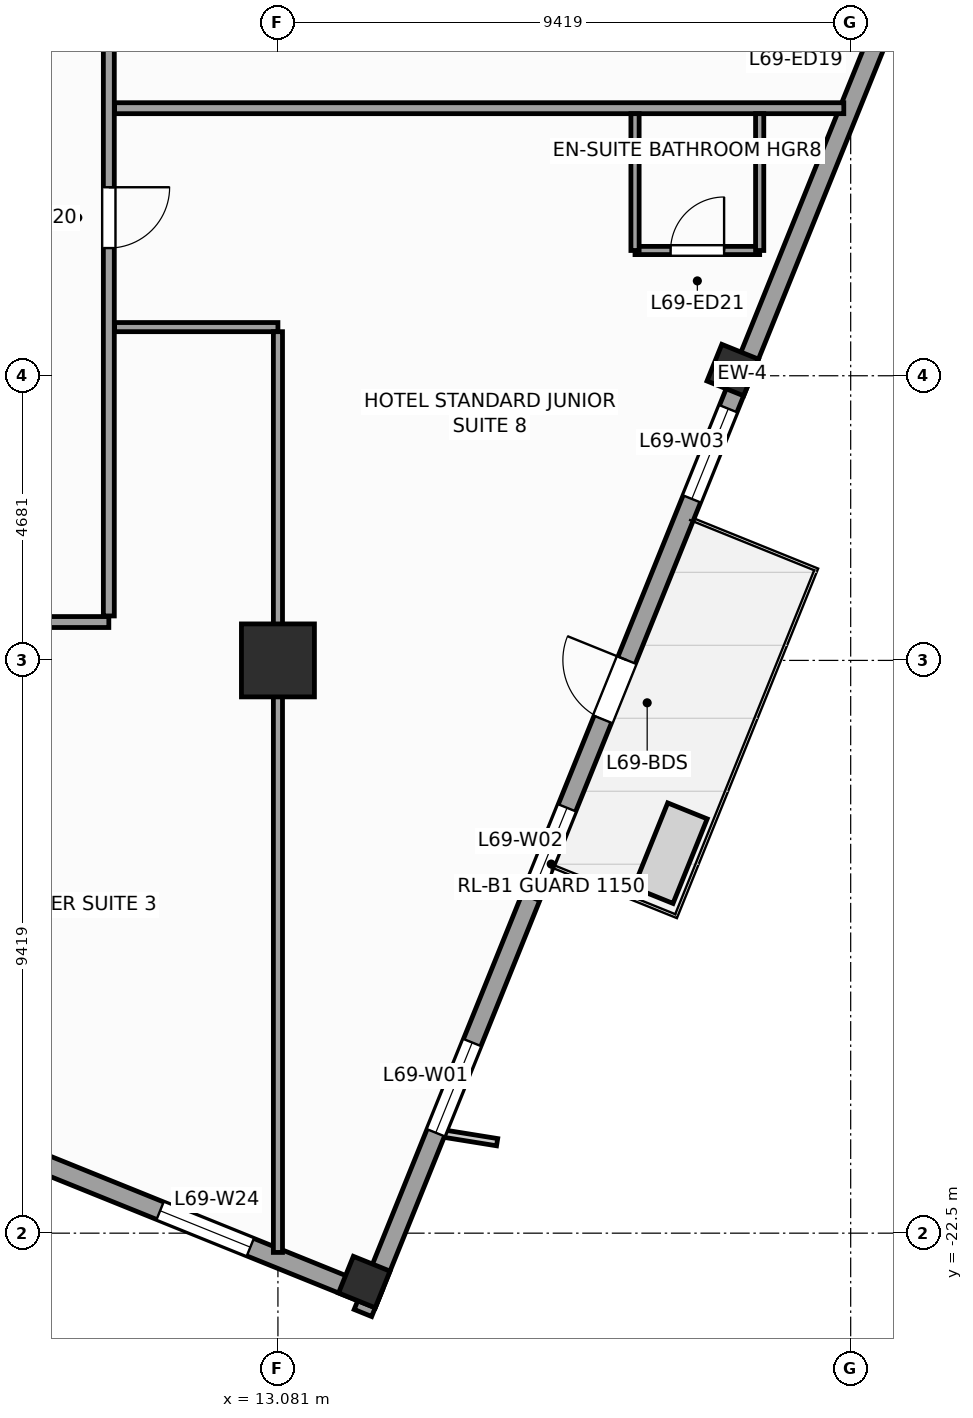
"""IFC4 building model, lengths in metres.
Left out: names, types, materials, properties, quantities, classifications, styles, units other than length and angle.
Written with IfcOpenShell. Run it as: python <this file> out.ifc"""

import sys

from ifc_helpers import new_model, si_unit, direction, frame, frame_2d, origin, origin_2d, place, context, subcontext, project, spatial, rectangle, extrude, source, transform, mapped, element, fill, save


model = new_model("IFC4")
c1 = context("Model", 3, precision=1e-05, world=origin(), true_north=direction((0.0, 1.0)))
c2 = subcontext(c1, "Body", "Model", "MODEL_VIEW")
j1 = project(units=[si_unit("LENGTHUNIT", "METRE"), si_unit("PLANEANGLEUNIT", "RADIAN")], contexts=[c1])
p1 = place(None, origin())
s1 = spatial("IfcSite", under=j1, at=p1, CompositionType="ELEMENT")
p2 = place(p1, origin())
s2 = spatial("IfcBuilding", under=s1, at=p2, CompositionType="ELEMENT")
p3 = place(p2, frame((0.0, 0.0, 283.2)))
s3 = spatial("IfcBuildingStorey", under=s2, at=p3, CompositionType="ELEMENT", Elevation=283.2)
m1 = source(origin(), c2, "Body", "SweptSolid", [
    extrude(rectangle(XDim=1.2, YDim=1.2, at=origin_2d()), origin(), (0.0, 0.0, 1.0), 3.6),
])
p4 = place(p3, frame((13.081, -13.081, 0.0), z_axis=(0.0, 0.0, 1.0), x_axis=(1.0, 0.0, 0.0)))
e1 = element("IfcColumn", 1, at=p4, inside=s3, PredefinedType="COLUMN", context=c2, shape_type="MappedRepresentation", body=[
    mapped(m1, transform((0.0, 0.0, 0.0), scale=1.0)),
])
m2 = source(origin(), c2, "Body", "SweptSolid", [
    extrude(rectangle(XDim=0.65, YDim=0.65, at=origin_2d()), origin(), (0.0, 0.0, 1.0), 3.6),
])
for number, where, z_axis, x_axis in (
    (2, (14.501, -23.304, 0.0), (0.0, 0.0, 1.0), (0.375, 0.927, 0.0)),
    (3, (20.56, -8.307, 0.0), (0.0, 0.0, 1.0), (0.375, 0.927, 0.0)),
):
    element("IfcColumn", number, at=place(p3, frame(where, z_axis=z_axis, x_axis=x_axis)), inside=s3, PredefinedType="COLUMN", context=c2, shape_type="MappedRepresentation", body=[
        mapped(m2, transform((0.0, 0.0, 0.0), scale=1.0)),
    ])
p5 = place(p3, frame((14.479, -23.813, 0.0), z_axis=(0.0, 0.0, 1.0), x_axis=(0.374609557019, 0.927182657188, 0.0)))
e4 = element("IfcWall", 4, at=p5, inside=s3, PredefinedType="STANDARD", context=c2, shape_type="SweptSolid", body=[
    extrude(rectangle(XDim=33.31, YDim=0.31, at=frame_2d((16.655, 0.0))), origin(), (0.0, 0.0, 1.0), 2.75),
])
p6 = place(p5, frame((10.53, 0.0, 0.0)))
e5 = element("IfcOpeningElement", 5, at=p6, cuts=e4, PredefinedType="OPENING", context=c2, shape_type="SweptSolid", body=[
    extrude(rectangle(XDim=1.05, YDim=2.25, at=frame_2d((0.525, 1.125))), frame((0.0, 0.165, 0.0), z_axis=(0.0, -1.0, 0.0), x_axis=(1.0, 0.0, 0.0)), (0.0, 0.0, 1.0), 0.33),
])
p7 = place(p5, frame((3.197, 0.0, 0.47)))
e6 = element("IfcOpeningElement", 6, at=p7, cuts=e4, PredefinedType="OPENING", context=c2, shape_type="SweptSolid", body=[
    extrude(rectangle(XDim=1.6, YDim=2.1, at=frame_2d((0.8, 1.05))), frame((0.0, 0.165, 0.0), z_axis=(0.0, -1.0, 0.0), x_axis=(1.0, 0.0, 0.0)), (0.0, 0.0, 1.0), 0.33),
])
p8 = place(p5, frame((7.36, 0.0, 0.47)))
e7 = element("IfcOpeningElement", 7, at=p8, cuts=e4, PredefinedType="OPENING", context=c2, shape_type="SweptSolid", body=[
    extrude(rectangle(XDim=1.6, YDim=2.1, at=frame_2d((0.8, 1.05))), frame((0.0, 0.165, 0.0), z_axis=(0.0, -1.0, 0.0), x_axis=(1.0, 0.0, 0.0)), (0.0, 0.0, 1.0), 0.33),
])
p9 = place(p5, frame((14.439, 0.0, 0.47)))
e8 = element("IfcOpeningElement", 8, at=p9, cuts=e4, PredefinedType="OPENING", context=c2, shape_type="SweptSolid", body=[
    extrude(rectangle(XDim=1.6, YDim=2.1, at=frame_2d((0.8, 1.05))), frame((0.0, 0.165, 0.0), z_axis=(0.0, -1.0, 0.0), x_axis=(1.0, 0.0, 0.0)), (0.0, 0.0, 1.0), 0.33),
])
p10 = place(p5, frame((23.351, 0.0, 0.47)))
e9 = element("IfcOpeningElement", 9, at=p10, cuts=e4, PredefinedType="OPENING", context=c2, shape_type="SweptSolid", body=[
    extrude(rectangle(XDim=1.6, YDim=2.1, at=frame_2d((0.8, 1.05))), frame((0.0, 0.165, 0.0), z_axis=(0.0, -1.0, 0.0), x_axis=(1.0, 0.0, 0.0)), (0.0, 0.0, 1.0), 0.33),
])
p11 = place(p5, frame((27.847, 0.0, 0.47)))
e10 = element("IfcOpeningElement", 10, at=p11, cuts=e4, PredefinedType="OPENING", context=c2, shape_type="SweptSolid", body=[
    extrude(rectangle(XDim=1.6, YDim=2.1, at=frame_2d((0.8, 1.05))), frame((0.0, 0.165, 0.0), z_axis=(0.0, -1.0, 0.0), x_axis=(1.0, 0.0, 0.0)), (0.0, 0.0, 1.0), 0.33),
])
p12 = place(p3, frame((9.032, -21.278, 0.0), z_axis=(0.0, 0.0, 1.0), x_axis=(0.927185411764, -0.374602739196, 0.0)))
e11 = element("IfcWall", 11, at=p12, inside=s3, PredefinedType="STANDARD", context=c2, shape_type="SweptSolid", body=[
    extrude(rectangle(XDim=6.155, YDim=0.31, at=frame_2d((3.078, 0.0))), origin(), (0.0, 0.0, 1.0), 3.35),
])
p13 = place(p12, frame((2.278, 0.0, 0.47)))
e12 = element("IfcOpeningElement", 12, at=p13, cuts=e11, PredefinedType="OPENING", context=c2, shape_type="SweptSolid", body=[
    extrude(rectangle(XDim=1.6, YDim=2.1, at=frame_2d((0.8, 1.05))), frame((0.0, 0.165, 0.0), z_axis=(0.0, -1.0, 0.0), x_axis=(1.0, 0.0, 0.0)), (0.0, 0.0, 1.0), 0.33),
])
p14 = place(p3, frame((-11.45, -12.45, 0.0), z_axis=(0.0, 0.0, 1.0), x_axis=(1.0, 0.0, 0.0)))
e13 = element("IfcWall", 13, at=p14, inside=s3, PredefinedType="PARTITIONING", context=c2, shape_type="SweptSolid", body=[
    extrude(rectangle(XDim=21.75, YDim=0.18, at=frame_2d((10.875, 0.0))), origin(), (0.0, 0.0, 1.0), 3.35),
])
p15 = place(p14, frame((12.436, 0.0, 0.0)))
e14 = element("IfcOpeningElement", 14, at=p15, cuts=e13, PredefinedType="OPENING", context=c2, shape_type="SweptSolid", body=[
    extrude(rectangle(XDim=0.95, YDim=2.1, at=frame_2d((0.475, 1.05))), frame((0.0, 0.1, 0.0), z_axis=(0.0, -1.0, 0.0), x_axis=(1.0, 0.0, 0.0)), (0.0, 0.0, 1.0), 0.2),
])
p16 = place(p14, frame((18.186, 0.0, 0.0)))
e15 = element("IfcOpeningElement", 15, at=p16, cuts=e13, PredefinedType="OPENING", context=c2, shape_type="SweptSolid", body=[
    extrude(rectangle(XDim=1.0, YDim=2.15, at=frame_2d((0.5, 1.075))), frame((0.0, 0.1, 0.0), z_axis=(0.0, -1.0, 0.0), x_axis=(1.0, 0.0, 0.0)), (0.0, 0.0, 1.0), 0.2),
])
p17 = place(p14, frame((14.5, 0.0, 0.0)))
e16 = element("IfcOpeningElement", 16, at=p17, cuts=e13, PredefinedType="OPENING", context=c2, shape_type="SweptSolid", body=[
    extrude(rectangle(XDim=1.0, YDim=2.15, at=frame_2d((0.5, 1.075))), frame((0.0, 0.1, 0.0), z_axis=(0.0, -1.0, 0.0), x_axis=(1.0, 0.0, 0.0)), (0.0, 0.0, 1.0), 0.2),
])
p18 = place(p14, frame((8.7, 0.0, 0.0)))
e17 = element("IfcOpeningElement", 17, at=p18, cuts=e13, PredefinedType="OPENING", context=c2, shape_type="SweptSolid", body=[
    extrude(rectangle(XDim=1.0, YDim=2.15, at=frame_2d((0.5, 1.075))), frame((0.0, 0.1, 0.0), z_axis=(0.0, -1.0, 0.0), x_axis=(1.0, 0.0, 0.0)), (0.0, 0.0, 1.0), 0.2),
])
p19 = place(p14, frame((3.139, 0.0, 0.0)))
e18 = element("IfcOpeningElement", 18, at=p19, cuts=e13, PredefinedType="OPENING", context=c2, shape_type="SweptSolid", body=[
    extrude(rectangle(XDim=1.0, YDim=2.15, at=frame_2d((0.5, 1.075))), frame((0.0, 0.1, 0.0), z_axis=(0.0, -1.0, 0.0), x_axis=(1.0, 0.0, 0.0)), (0.0, 0.0, 1.0), 0.2),
])
p20 = place(p3, frame((10.3, -12.35, 0.0), z_axis=(0.0, 0.0, 1.0), x_axis=(0.0, 1.0, 0.0)))
e19 = element("IfcWall", 19, at=p20, inside=s3, PredefinedType="PARTITIONING", context=c2, shape_type="SweptSolid", body=[
    extrude(rectangle(XDim=23.7, YDim=0.18, at=frame_2d((11.85, 0.0))), origin(), (0.0, 0.0, 1.0), 3.35),
])
p21 = place(p20, frame((17.65, 0.0, 0.0)))
e20 = element("IfcOpeningElement", 20, at=p21, cuts=e19, PredefinedType="OPENING", context=c2, shape_type="SweptSolid", body=[
    extrude(rectangle(XDim=1.0, YDim=2.15, at=frame_2d((0.5, 1.075))), frame((0.0, 0.1, 0.0), z_axis=(0.0, -1.0, 0.0), x_axis=(1.0, 0.0, 0.0)), (0.0, 0.0, 1.0), 0.2),
])
p22 = place(p20, frame((13.85, 0.0, 0.0)))
e21 = element("IfcOpeningElement", 21, at=p22, cuts=e19, PredefinedType="OPENING", context=c2, shape_type="SweptSolid", body=[
    extrude(rectangle(XDim=1.0, YDim=2.15, at=frame_2d((0.5, 1.075))), frame((0.0, 0.1, 0.0), z_axis=(0.0, -1.0, 0.0), x_axis=(1.0, 0.0, 0.0)), (0.0, 0.0, 1.0), 0.2),
])
p23 = place(p20, frame((9.85, 0.0, 0.0)))
e22 = element("IfcOpeningElement", 22, at=p23, cuts=e19, PredefinedType="OPENING", context=c2, shape_type="SweptSolid", body=[
    extrude(rectangle(XDim=1.0, YDim=2.15, at=frame_2d((0.5, 1.075))), frame((0.0, 0.1, 0.0), z_axis=(0.0, -1.0, 0.0), x_axis=(1.0, 0.0, 0.0)), (0.0, 0.0, 1.0), 0.2),
])
p24 = place(p20, frame((6.05, 0.0, 0.0)))
e23 = element("IfcOpeningElement", 23, at=p24, cuts=e19, PredefinedType="OPENING", context=c2, shape_type="SweptSolid", body=[
    extrude(rectangle(XDim=1.0, YDim=2.15, at=frame_2d((0.5, 1.075))), frame((0.0, 0.1, 0.0), z_axis=(0.0, -1.0, 0.0), x_axis=(1.0, 0.0, 0.0)), (0.0, 0.0, 1.0), 0.2),
])
p25 = place(p3, frame((10.395, -4.0, 0.0), z_axis=(0.0, 0.0, 1.0), x_axis=(1.0, 0.0, 0.0)))
e24 = element("IfcWall", 24, at=p25, inside=s3, PredefinedType="PARTITIONING", context=c2, shape_type="SweptSolid", body=[
    extrude(rectangle(XDim=11.992, YDim=0.18, at=frame_2d((5.996, 0.0))), origin(), (0.0, 0.0, 1.0), 3.35),
])
p26 = place(p3, frame((10.395, -7.6, 0.0), z_axis=(0.0, 0.0, 1.0), x_axis=(1.0, 0.0, 0.0)))
e25 = element("IfcWall", 25, at=p26, inside=s3, PredefinedType="PARTITIONING", context=c2, shape_type="SweptSolid", body=[
    extrude(rectangle(XDim=2.686, YDim=0.15, at=frame_2d((1.343, 0.0))), origin(), (0.0, 0.0, 1.0), 3.35),
])
p27 = place(p3, frame((13.081, -7.675, 0.0), z_axis=(0.0, 0.0, 1.0), x_axis=(0.0, -1.0, 0.0)))
e26 = element("IfcWall", 26, at=p27, inside=s3, PredefinedType="PARTITIONING", context=c2, shape_type="SweptSolid", body=[
    extrude(rectangle(XDim=15.142, YDim=0.15, at=frame_2d((7.571, 0.0))), origin(), (0.0, 0.0, 1.0), 2.45),
])
p28 = place(p3, frame((18.953, -6.34, 0.0), z_axis=(0.0, 0.0, 1.0), x_axis=(1.0, 0.0, 0.0)))
e27 = element("IfcWall", 27, at=p28, inside=s3, PredefinedType="PARTITIONING", context=c2, shape_type="SweptSolid", body=[
    extrude(rectangle(XDim=2.05, YDim=0.135, at=frame_2d((1.025, 0.0))), origin(), (0.0, 0.0, 1.0), 3.35),
])
p29 = place(p28, frame((0.585, 0.0, 0.0)))
e28 = element("IfcOpeningElement", 28, at=p29, cuts=e27, PredefinedType="OPENING", context=c2, shape_type="SweptSolid", body=[
    extrude(rectangle(XDim=0.88, YDim=2.1, at=frame_2d((0.44, 1.05))), frame((0.0, 0.078, 0.0), z_axis=(0.0, -1.0, 0.0), x_axis=(1.0, 0.0, 0.0)), (0.0, 0.0, 1.0), 0.155),
])
for number, where, z_axis, x_axis in (
    (29, (21.003, -6.34, 0.0), (0.0, 0.0, 1.0), (0.0, 1.0, 0.0)),
    (30, (18.953, -6.34, 0.0), (0.0, 0.0, 1.0), (0.0, 1.0, 0.0)),
):
    element("IfcWall", number, at=place(p3, frame(where, z_axis=z_axis, x_axis=x_axis)), inside=s3, PredefinedType="PARTITIONING", context=c2, shape_type="SweptSolid", body=[
        extrude(rectangle(XDim=2.25, YDim=0.135, at=frame_2d((1.125, 0.0))), origin(), (0.0, 0.0, 1.0), 3.35),
    ])
m3 = source(origin(), c2, "Body", "SweptSolid", [
    extrude(rectangle(XDim=1.05, YDim=2.25, at=frame_2d((0.525, 1.125))), frame((0.0, 0.025, 0.0), z_axis=(0.0, -1.0, 0.0), x_axis=(1.0, 0.0, 0.0)), (0.0, 0.0, 1.0), 0.05),
])
p30 = place(p6, origin())
e31 = element("IfcDoor", 31, at=p30, inside=s3, OperationType="SINGLE_SWING_RIGHT", PredefinedType="DOOR", context=c2, shape_type="MappedRepresentation", body=[
    mapped(m3, transform((0.0, 0.0, 0.0), scale=1.0)),
])
fill(e5, e31)
m4 = source(origin(), c2, "Body", "SweptSolid", [
    extrude(rectangle(XDim=1.6, YDim=2.1, at=frame_2d((0.8, 1.05))), frame((0.0, 0.03, 0.0), z_axis=(0.0, -1.0, 0.0), x_axis=(1.0, 0.0, 0.0)), (0.0, 0.0, 1.0), 0.06),
])
p31 = place(p7, origin())
e32 = element("IfcWindow", 32, at=p31, inside=s3, PartitioningType="SINGLE_PANEL", PredefinedType="WINDOW", context=c2, shape_type="MappedRepresentation", body=[
    mapped(m4, transform((0.0, 0.0, 0.0), scale=1.0)),
])
fill(e6, e32)
p32 = place(p8, origin())
e33 = element("IfcWindow", 33, at=p32, inside=s3, PartitioningType="SINGLE_PANEL", PredefinedType="WINDOW", context=c2, shape_type="MappedRepresentation", body=[
    mapped(m4, transform((0.0, 0.0, 0.0), scale=1.0)),
])
fill(e7, e33)
p33 = place(p9, origin())
e34 = element("IfcWindow", 34, at=p33, inside=s3, PartitioningType="SINGLE_PANEL", PredefinedType="WINDOW", context=c2, shape_type="MappedRepresentation", body=[
    mapped(m4, transform((0.0, 0.0, 0.0), scale=1.0)),
])
fill(e8, e34)
p34 = place(p13, origin())
e35 = element("IfcWindow", 35, at=p34, inside=s3, PartitioningType="SINGLE_PANEL", PredefinedType="WINDOW", context=c2, shape_type="MappedRepresentation", body=[
    mapped(m4, transform((0.0, 0.0, 0.0), scale=1.0)),
])
fill(e12, e35)
m5 = source(origin(), c2, "Body", "SweptSolid", [
    extrude(rectangle(XDim=1.0, YDim=2.15, at=frame_2d((0.5, 1.075))), frame((0.0, 0.025, 0.0), z_axis=(0.0, -1.0, 0.0), x_axis=(1.0, 0.0, 0.0)), (0.0, 0.0, 1.0), 0.05),
])
p35 = place(p24, frame((1.0, 0.0, 0.0), z_axis=(0.0, 0.0, 1.0), x_axis=(-1.0, 0.0, 0.0)))
e36 = element("IfcDoor", 36, at=p35, inside=s3, OperationType="SINGLE_SWING_RIGHT", PredefinedType="DOOR", context=c2, shape_type="MappedRepresentation", body=[
    mapped(m5, transform((0.0, 0.0, 0.0), scale=1.0)),
])
fill(e23, e36)
m6 = source(origin(), c2, "Body", "SweptSolid", [
    extrude(rectangle(XDim=0.88, YDim=2.1, at=frame_2d((0.44, 1.05))), frame((0.0, 0.025, 0.0), z_axis=(0.0, -1.0, 0.0), x_axis=(1.0, 0.0, 0.0)), (0.0, 0.0, 1.0), 0.05),
])
p36 = place(p29, origin())
e37 = element("IfcDoor", 37, at=p36, inside=s3, OperationType="SINGLE_SWING_RIGHT", PredefinedType="DOOR", context=c2, shape_type="MappedRepresentation", body=[
    mapped(m6, transform((0.0, 0.0, 0.0), scale=1.0)),
])
fill(e28, e37)
save(model, sys.argv[1])
